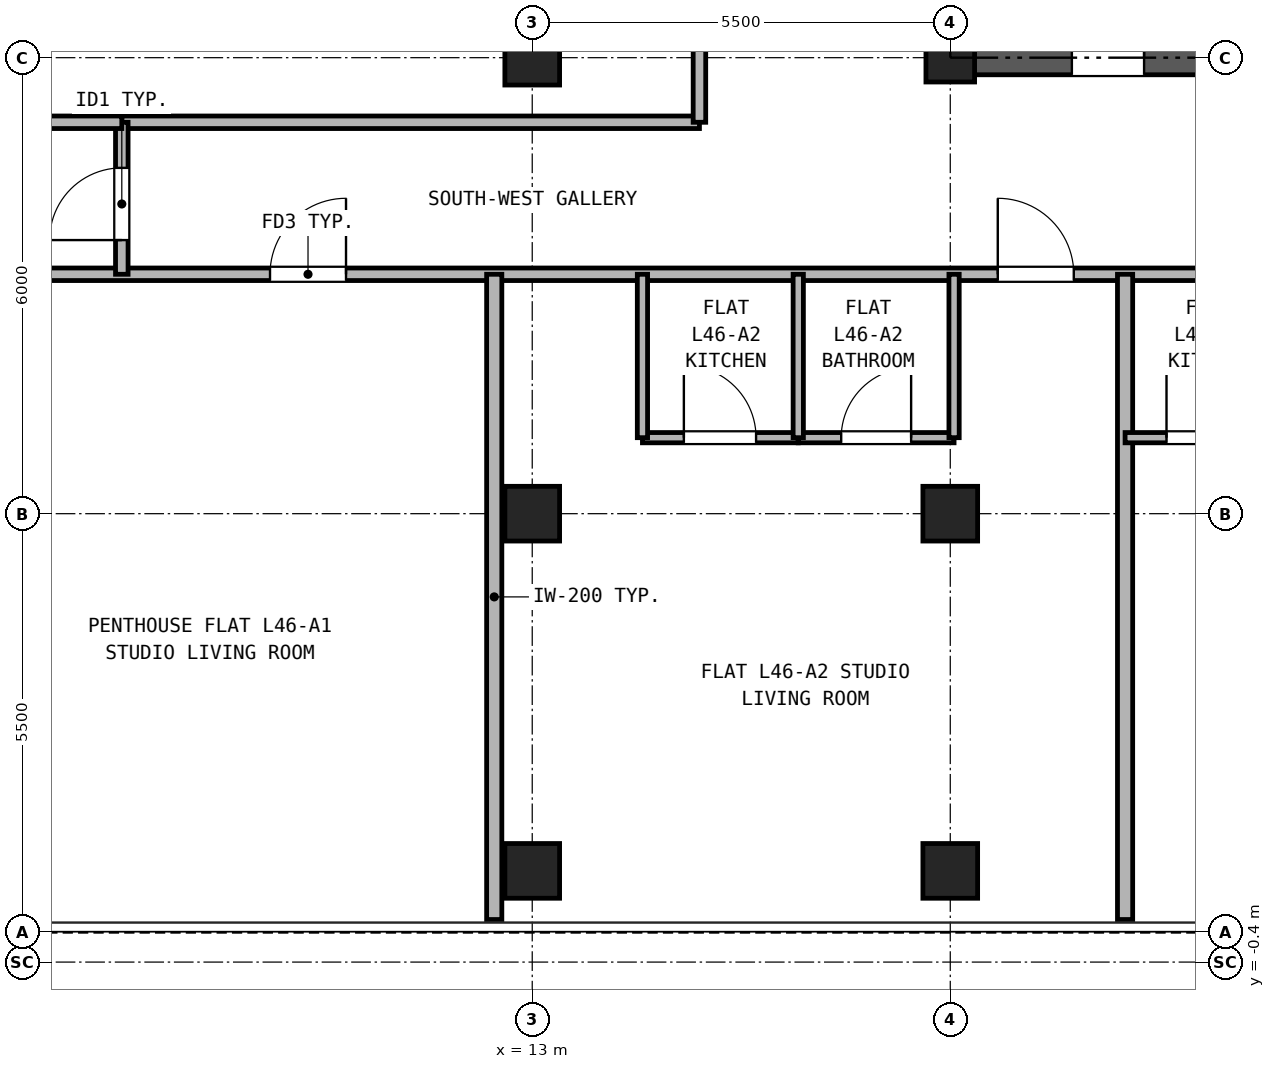
"""IFC4 building model, lengths in metres.
Left out: names, types, materials, properties, quantities, classifications, styles, units other than length and angle.
Written with IfcOpenShell. Run it as: python <this file> out.ifc"""

import sys

from ifc_helpers import new_model, si_unit, direction, frame, frame_2d, origin, origin_2d, place, context, subcontext, project, spatial, rectangle, hollow_rectangle, extrude, source, transform, mapped, element, fill, save


model = new_model("IFC4")
c1 = context("Model", 3, precision=1e-05, world=origin(), true_north=direction((0.0, 1.0)))
c2 = subcontext(c1, "Body", "Model", "MODEL_VIEW")
j1 = project(units=[si_unit("LENGTHUNIT", "METRE"), si_unit("PLANEANGLEUNIT", "RADIAN")], contexts=[c1])
p1 = place(None, origin())
s1 = spatial("IfcSite", under=j1, at=p1, CompositionType="ELEMENT")
p2 = place(p1, origin())
s2 = spatial("IfcBuilding", under=s1, at=p2, CompositionType="ELEMENT")
p3 = place(p2, frame((0.0, 0.0, 165.7)))
s3 = spatial("IfcBuildingStorey", under=s2, at=p3, CompositionType="ELEMENT", Elevation=165.7)
m1 = source(origin(), c2, "Body", "SweptSolid", [
    extrude(hollow_rectangle(XDim=0.72, YDim=0.72, WallThickness=0.04, at=origin_2d()), origin(), (0.0, 0.0, 1.0), 2.95),
])
for number, where, z_axis, x_axis in (
    (1, (13.0, 0.8, 0.0), (0.0, 0.0, 1.0), (1.0, 0.0, 0.0)),
    (2, (18.5, 0.8, 0.0), (0.0, 0.0, 1.0), (1.0, 0.0, 0.0)),
    (3, (13.0, 5.5, 0.0), (0.0, 0.0, 1.0), (1.0, 0.0, 0.0)),
    (4, (13.0, 11.5, 0.0), (0.0, 0.0, 1.0), (1.0, 0.0, 0.0)),
    (5, (18.5, 5.5, 0.0), (0.0, 0.0, 1.0), (1.0, 0.0, 0.0)),
):
    element("IfcColumn", number, at=place(p3, frame(where, z_axis=z_axis, x_axis=x_axis)), inside=s3, PredefinedType="COLUMN", context=c2, shape_type="MappedRepresentation", body=[
        mapped(m1, transform((0.0, 0.0, 0.0), x_axis=(1.0, 0.0, 0.0), y_axis=(0.0, 1.0, 0.0), z_axis=(0.0, 0.0, 1.0), scale=1.0)),
    ])
m2 = source(origin(), c2, "Body", "SweptSolid", [
    extrude(hollow_rectangle(XDim=0.64, YDim=0.64, WallThickness=0.035, at=origin_2d()), origin(), (0.0, 0.0, 1.0), 2.95),
])
p4 = place(p3, frame((18.5, 11.5, 0.0), z_axis=(0.0, 0.0, 1.0), x_axis=(1.0, 0.0, 0.0)))
e6 = element("IfcColumn", 6, at=p4, inside=s3, PredefinedType="COLUMN", context=c2, shape_type="MappedRepresentation", body=[
    mapped(m2, transform((0.0, 0.0, 0.0), x_axis=(1.0, 0.0, 0.0), y_axis=(0.0, 1.0, 0.0), z_axis=(0.0, 0.0, 1.0), scale=1.0)),
])
p5 = place(p3, frame((18.275, 11.5, 0.0), z_axis=(0.0, 0.0, 1.0), x_axis=(1.0, 0.0, 0.0)))
e7 = element("IfcWall", 7, at=p5, inside=s3, PredefinedType="SHEAR", context=c2, shape_type="SweptSolid", body=[
    extrude(rectangle(XDim=10.45, YDim=0.45, at=frame_2d((5.225, 0.0))), origin(), (0.0, 0.0, 1.0), 2.95),
])
p6 = place(p5, frame((1.825, 0.0, 0.0)))
e8 = element("IfcOpeningElement", 8, at=p6, cuts=e7, PredefinedType="OPENING", context=c2, shape_type="SweptSolid", body=[
    extrude(rectangle(XDim=0.95, YDim=2.15, at=frame_2d((0.475, 1.075))), frame((0.0, 0.235, 0.0), z_axis=(0.0, -1.0, 0.0), x_axis=(1.0, 0.0, 0.0)), (0.0, 0.0, 1.0), 0.47),
])
p7 = place(p5, frame((5.325, 0.0, 0.0)))
e9 = element("IfcOpeningElement", 9, at=p7, cuts=e7, PredefinedType="OPENING", context=c2, shape_type="SweptSolid", body=[
    extrude(rectangle(XDim=0.95, YDim=2.15, at=frame_2d((0.475, 1.075))), frame((0.0, 0.235, 0.0), z_axis=(0.0, -1.0, 0.0), x_axis=(1.0, 0.0, 0.0)), (0.0, 0.0, 1.0), 0.47),
])
p8 = place(p5, frame((8.225, 0.0, 0.0)))
e10 = element("IfcOpeningElement", 10, at=p8, cuts=e7, PredefinedType="OPENING", context=c2, shape_type="SweptSolid", body=[
    extrude(rectangle(XDim=1.1, YDim=2.25, at=frame_2d((0.55, 1.125))), frame((0.0, 0.235, 0.0), z_axis=(0.0, -1.0, 0.0), x_axis=(1.0, 0.0, 0.0)), (0.0, 0.0, 1.0), 0.47),
])
p9 = place(p3, frame((0.16, 8.65, 0.0), z_axis=(0.0, 0.0, 1.0), x_axis=(1.0, 0.0, 0.0)))
e11 = element("IfcWall", 11, at=p9, inside=s3, PredefinedType="PARTITIONING", context=c2, shape_type="SweptSolid", body=[
    extrude(rectangle(XDim=41.48, YDim=0.165, at=frame_2d((20.74, 0.0))), origin(), (0.0, 0.0, 1.0), 2.583),
])
p10 = place(p9, frame((9.39, 0.0, 0.0)))
e12 = element("IfcOpeningElement", 12, at=p10, cuts=e11, PredefinedType="OPENING", context=c2, shape_type="SweptSolid", body=[
    extrude(rectangle(XDim=1.0, YDim=2.15, at=frame_2d((0.5, 1.075))), frame((0.0, 0.093, 0.0), z_axis=(0.0, -1.0, 0.0), x_axis=(1.0, 0.0, 0.0)), (0.0, 0.0, 1.0), 0.185),
])
p11 = place(p9, frame((18.965, 0.0, 0.0)))
e13 = element("IfcOpeningElement", 13, at=p11, cuts=e11, PredefinedType="OPENING", context=c2, shape_type="SweptSolid", body=[
    extrude(rectangle(XDim=1.0, YDim=2.15, at=frame_2d((0.5, 1.075))), frame((0.0, 0.093, 0.0), z_axis=(0.0, -1.0, 0.0), x_axis=(1.0, 0.0, 0.0)), (0.0, 0.0, 1.0), 0.185),
])
p12 = place(p9, frame((26.34, 0.0, 0.0)))
e14 = element("IfcOpeningElement", 14, at=p12, cuts=e11, PredefinedType="OPENING", context=c2, shape_type="SweptSolid", body=[
    extrude(rectangle(XDim=1.0, YDim=2.15, at=frame_2d((0.5, 1.075))), frame((0.0, 0.093, 0.0), z_axis=(0.0, -1.0, 0.0), x_axis=(1.0, 0.0, 0.0)), (0.0, 0.0, 1.0), 0.185),
])
p13 = place(p9, frame((31.715, 0.0, 0.0)))
e15 = element("IfcOpeningElement", 15, at=p13, cuts=e11, PredefinedType="OPENING", context=c2, shape_type="SweptSolid", body=[
    extrude(rectangle(XDim=1.0, YDim=2.15, at=frame_2d((0.5, 1.075))), frame((0.0, 0.093, 0.0), z_axis=(0.0, -1.0, 0.0), x_axis=(1.0, 0.0, 0.0)), (0.0, 0.0, 1.0), 0.185),
])
p14 = place(p3, frame((7.6, 10.65, 0.0), z_axis=(0.0, 0.0, 1.0), x_axis=(1.0, 0.0, 0.0)))
e16 = element("IfcWall", 16, at=p14, inside=s3, PredefinedType="PARTITIONING", context=c2, shape_type="SweptSolid", body=[
    extrude(rectangle(XDim=7.6, YDim=0.165, at=frame_2d((3.8, 0.0))), origin(), (0.0, 0.0, 1.0), 2.95),
])
p15 = place(p3, frame((7.6, 8.65, 0.0), z_axis=(0.0, 0.0, 1.0), x_axis=(0.0, 1.0, 0.0)))
e17 = element("IfcWall", 17, at=p15, inside=s3, PredefinedType="PARTITIONING", context=c2, shape_type="SweptSolid", body=[
    extrude(rectangle(XDim=2.0, YDim=0.165, at=frame_2d((1.0, 0.0))), origin(), (0.0, 0.0, 1.0), 2.95),
])
p16 = place(p15, frame((0.45, 0.0, 0.0)))
e18 = element("IfcOpeningElement", 18, at=p16, cuts=e17, PredefinedType="OPENING", context=c2, shape_type="SweptSolid", body=[
    extrude(rectangle(XDim=0.95, YDim=2.15, at=frame_2d((0.475, 1.075))), frame((0.0, 0.093, 0.0), z_axis=(0.0, -1.0, 0.0), x_axis=(1.0, 0.0, 0.0)), (0.0, 0.0, 1.0), 0.185),
])
p17 = place(p3, frame((15.2, 10.65, 0.0), z_axis=(0.0, 0.0, 1.0), x_axis=(0.0, 1.0, 0.0)))
e19 = element("IfcWall", 19, at=p17, inside=s3, PredefinedType="PARTITIONING", context=c2, shape_type="SweptSolid", body=[
    extrude(rectangle(XDim=24.49, YDim=0.165, at=frame_2d((12.245, 0.0))), origin(), (0.0, 0.0, 1.0), 2.95),
])
p18 = place(p17, frame((3.425, 0.0, 0.0)))
e20 = element("IfcOpeningElement", 20, at=p18, cuts=e19, PredefinedType="OPENING", context=c2, shape_type="SweptSolid", body=[
    extrude(rectangle(XDim=0.95, YDim=2.15, at=frame_2d((0.475, 1.075))), frame((0.0, 0.093, 0.0), z_axis=(0.0, -1.0, 0.0), x_axis=(1.0, 0.0, 0.0)), (0.0, 0.0, 1.0), 0.185),
])
p19 = place(p17, frame((10.85, 0.0, 0.0)))
e21 = element("IfcOpeningElement", 21, at=p19, cuts=e19, PredefinedType="OPENING", context=c2, shape_type="SweptSolid", body=[
    extrude(rectangle(XDim=0.95, YDim=2.15, at=frame_2d((0.475, 1.075))), frame((0.0, 0.093, 0.0), z_axis=(0.0, -1.0, 0.0), x_axis=(1.0, 0.0, 0.0)), (0.0, 0.0, 1.0), 0.185),
])
p20 = place(p17, frame((16.7, 0.0, 0.0)))
e22 = element("IfcOpeningElement", 22, at=p20, cuts=e19, PredefinedType="OPENING", context=c2, shape_type="SweptSolid", body=[
    extrude(rectangle(XDim=0.95, YDim=2.15, at=frame_2d((0.475, 1.075))), frame((0.0, 0.093, 0.0), z_axis=(0.0, -1.0, 0.0), x_axis=(1.0, 0.0, 0.0)), (0.0, 0.0, 1.0), 0.185),
])
p21 = place(p17, frame((21.52, 0.0, 0.0)))
e23 = element("IfcOpeningElement", 23, at=p21, cuts=e19, PredefinedType="OPENING", context=c2, shape_type="SweptSolid", body=[
    extrude(rectangle(XDim=0.92, YDim=2.1, at=frame_2d((0.46, 1.05))), frame((0.0, 0.093, 0.0), z_axis=(0.0, -1.0, 0.0), x_axis=(1.0, 0.0, 0.0)), (0.0, 0.0, 1.0), 0.185),
])
p22 = place(p3, frame((12.5, 0.16, 0.0), z_axis=(0.0, 0.0, 1.0), x_axis=(0.0, 1.0, 0.0)))
e24 = element("IfcWall", 24, at=p22, inside=s3, PredefinedType="PARTITIONING", context=c2, shape_type="SweptSolid", body=[
    extrude(rectangle(XDim=8.49, YDim=0.2, at=frame_2d((4.245, 0.0))), origin(), (0.0, 0.0, 1.0), 2.95),
])
p23 = place(p3, frame((14.45, 6.5, 0.0), z_axis=(0.0, 0.0, 1.0), x_axis=(1.0, 0.0, 0.0)))
e25 = element("IfcWall", 25, at=p23, inside=s3, PredefinedType="PARTITIONING", context=c2, shape_type="SweptSolid", body=[
    extrude(rectangle(XDim=2.05, YDim=0.135, at=frame_2d((1.025, 0.0))), origin(), (0.0, 0.0, 1.0), 2.95),
])
p24 = place(p23, frame((0.545, 0.0, 0.0)))
e26 = element("IfcOpeningElement", 26, at=p24, cuts=e25, PredefinedType="OPENING", context=c2, shape_type="SweptSolid", body=[
    extrude(rectangle(XDim=0.95, YDim=2.15, at=frame_2d((0.475, 1.075))), frame((0.0, 0.077, 0.0), z_axis=(0.0, -1.0, 0.0), x_axis=(1.0, 0.0, 0.0)), (0.0, 0.0, 1.0), 0.155),
])
p25 = place(p3, frame((16.5, 6.5, 0.0), z_axis=(0.0, 0.0, 1.0), x_axis=(1.0, 0.0, 0.0)))
e27 = element("IfcWall", 27, at=p25, inside=s3, PredefinedType="PARTITIONING", context=c2, shape_type="SweptSolid", body=[
    extrude(rectangle(XDim=2.05, YDim=0.135, at=frame_2d((1.025, 0.0))), origin(), (0.0, 0.0, 1.0), 2.95),
])
p26 = place(p25, frame((0.565, 0.0, 0.0)))
e28 = element("IfcOpeningElement", 28, at=p26, cuts=e27, PredefinedType="OPENING", context=c2, shape_type="SweptSolid", body=[
    extrude(rectangle(XDim=0.92, YDim=2.1, at=frame_2d((0.46, 1.05))), frame((0.0, 0.077, 0.0), z_axis=(0.0, -1.0, 0.0), x_axis=(1.0, 0.0, 0.0)), (0.0, 0.0, 1.0), 0.155),
])
for number, where, z_axis, x_axis in (
    (29, (14.45, 6.5, 0.0), (0.0, 0.0, 1.0), (0.0, 1.0, 0.0)),
    (30, (16.5, 6.5, 0.0), (0.0, 0.0, 1.0), (0.0, 1.0, 0.0)),
):
    element("IfcWall", number, at=place(p3, frame(where, z_axis=z_axis, x_axis=x_axis)), inside=s3, PredefinedType="PARTITIONING", context=c2, shape_type="SweptSolid", body=[
        extrude(rectangle(XDim=2.15, YDim=0.135, at=frame_2d((1.075, 0.0))), origin(), (0.0, 0.0, 1.0), 2.95),
    ])
p27 = place(p3, frame((18.55, 6.5, 0.0), z_axis=(0.0, 0.0, 1.0), x_axis=(0.0, 1.0, 0.0)))
e31 = element("IfcWall", 31, at=p27, inside=s3, PredefinedType="PARTITIONING", context=c2, shape_type="SweptSolid", body=[
    extrude(rectangle(XDim=2.15, YDim=0.135, at=frame_2d((1.075, 0.0))), origin(), (0.0, 0.0, 1.0), 2.323),
])
p28 = place(p3, frame((20.8, 0.16, 0.0), z_axis=(0.0, 0.0, 1.0), x_axis=(0.0, 1.0, 0.0)))
e32 = element("IfcWall", 32, at=p28, inside=s3, PredefinedType="PARTITIONING", context=c2, shape_type="SweptSolid", body=[
    extrude(rectangle(XDim=8.49, YDim=0.2, at=frame_2d((4.245, 0.0))), origin(), (0.0, 0.0, 1.0), 2.95),
])
p29 = place(p3, frame((20.8, 6.5, 0.0), z_axis=(0.0, 0.0, 1.0), x_axis=(1.0, 0.0, 0.0)))
e33 = element("IfcWall", 33, at=p29, inside=s3, PredefinedType="PARTITIONING", context=c2, shape_type="SweptSolid", body=[
    extrude(rectangle(XDim=2.05, YDim=0.135, at=frame_2d((1.025, 0.0))), origin(), (0.0, 0.0, 1.0), 2.95),
])
p30 = place(p29, frame((0.545, 0.0, 0.0)))
e34 = element("IfcOpeningElement", 34, at=p30, cuts=e33, PredefinedType="OPENING", context=c2, shape_type="SweptSolid", body=[
    extrude(rectangle(XDim=0.95, YDim=2.15, at=frame_2d((0.475, 1.075))), frame((0.0, 0.077, 0.0), z_axis=(0.0, -1.0, 0.0), x_axis=(1.0, 0.0, 0.0)), (0.0, 0.0, 1.0), 0.155),
])
p31 = place(p3, frame((0.16, 10.65, 0.0), z_axis=(0.0, 0.0, 1.0), x_axis=(1.0, 0.0, 0.0)))
e35 = element("IfcWall", 35, at=p31, inside=s3, PredefinedType="PARTITIONING", context=c2, shape_type="SweptSolid", body=[
    extrude(rectangle(XDim=7.44, YDim=0.165, at=frame_2d((3.72, 0.0))), origin(), (0.0, 0.0, 1.0), 2.95),
])
p32 = place(p6, frame((0.95, 0.0, 0.0), z_axis=(0.0, 0.0, 1.0), x_axis=(-1.0, 0.0, 0.0)))
e36 = element("IfcDoor", 36, at=p32, inside=s3, OperationType="SINGLE_SWING_RIGHT", PredefinedType="DOOR", context=c2, shape_type="SweptSolid", body=[
    extrude(rectangle(XDim=0.95, YDim=2.15, at=frame_2d((0.475, 1.075))), frame((0.0, 0.025, 0.0), z_axis=(0.0, -1.0, 0.0), x_axis=(1.0, 0.0, 0.0)), (0.0, 0.0, 1.0), 0.05),
])
fill(e8, e36)
p33 = place(p10, frame((1.0, 0.0, 0.0), z_axis=(0.0, 0.0, 1.0), x_axis=(-1.0, 0.0, 0.0)))
e37 = element("IfcDoor", 37, at=p33, inside=s3, OperationType="SINGLE_SWING_RIGHT", PredefinedType="DOOR", context=c2, shape_type="SweptSolid", body=[
    extrude(rectangle(XDim=1.0, YDim=2.15, at=frame_2d((0.5, 1.075))), frame((0.0, 0.025, 0.0), z_axis=(0.0, -1.0, 0.0), x_axis=(1.0, 0.0, 0.0)), (0.0, 0.0, 1.0), 0.05),
])
fill(e12, e37)
p34 = place(p24, origin())
e38 = element("IfcDoor", 38, at=p34, inside=s3, OperationType="SINGLE_SWING_LEFT", PredefinedType="DOOR", context=c2, shape_type="SweptSolid", body=[
    extrude(rectangle(XDim=0.95, YDim=2.15, at=frame_2d((0.475, 1.075))), frame((0.0, 0.025, 0.0), z_axis=(0.0, -1.0, 0.0), x_axis=(1.0, 0.0, 0.0)), (0.0, 0.0, 1.0), 0.05),
])
fill(e26, e38)
p35 = place(p26, origin())
e39 = element("IfcDoor", 39, at=p35, inside=s3, OperationType="SINGLE_SWING_RIGHT", PredefinedType="DOOR", context=c2, shape_type="SweptSolid", body=[
    extrude(rectangle(XDim=0.92, YDim=2.1, at=frame_2d((0.46, 1.05))), frame((0.0, 0.025, 0.0), z_axis=(0.0, -1.0, 0.0), x_axis=(1.0, 0.0, 0.0)), (0.0, 0.0, 1.0), 0.05),
])
fill(e28, e39)
p36 = place(p11, frame((1.0, 0.0, 0.0), z_axis=(0.0, 0.0, 1.0), x_axis=(-1.0, 0.0, 0.0)))
e40 = element("IfcDoor", 40, at=p36, inside=s3, OperationType="SINGLE_SWING_LEFT", PredefinedType="DOOR", context=c2, shape_type="SweptSolid", body=[
    extrude(rectangle(XDim=1.0, YDim=2.15, at=frame_2d((0.5, 1.075))), frame((0.0, 0.025, 0.0), z_axis=(0.0, -1.0, 0.0), x_axis=(1.0, 0.0, 0.0)), (0.0, 0.0, 1.0), 0.05),
])
fill(e13, e40)
p37 = place(p30, origin())
e41 = element("IfcDoor", 41, at=p37, inside=s3, OperationType="SINGLE_SWING_LEFT", PredefinedType="DOOR", context=c2, shape_type="SweptSolid", body=[
    extrude(rectangle(XDim=0.95, YDim=2.15, at=frame_2d((0.475, 1.075))), frame((0.0, 0.025, 0.0), z_axis=(0.0, -1.0, 0.0), x_axis=(1.0, 0.0, 0.0)), (0.0, 0.0, 1.0), 0.05),
])
fill(e34, e41)
p38 = place(p16, frame((0.95, 0.0, 0.0), z_axis=(0.0, 0.0, 1.0), x_axis=(-1.0, 0.0, 0.0)))
e42 = element("IfcDoor", 42, at=p38, inside=s3, OperationType="SINGLE_SWING_LEFT", PredefinedType="DOOR", context=c2, shape_type="SweptSolid", body=[
    extrude(rectangle(XDim=0.95, YDim=2.15, at=frame_2d((0.475, 1.075))), frame((0.0, 0.025, 0.0), z_axis=(0.0, -1.0, 0.0), x_axis=(1.0, 0.0, 0.0)), (0.0, 0.0, 1.0), 0.05),
])
fill(e18, e42)
save(model, sys.argv[1])
